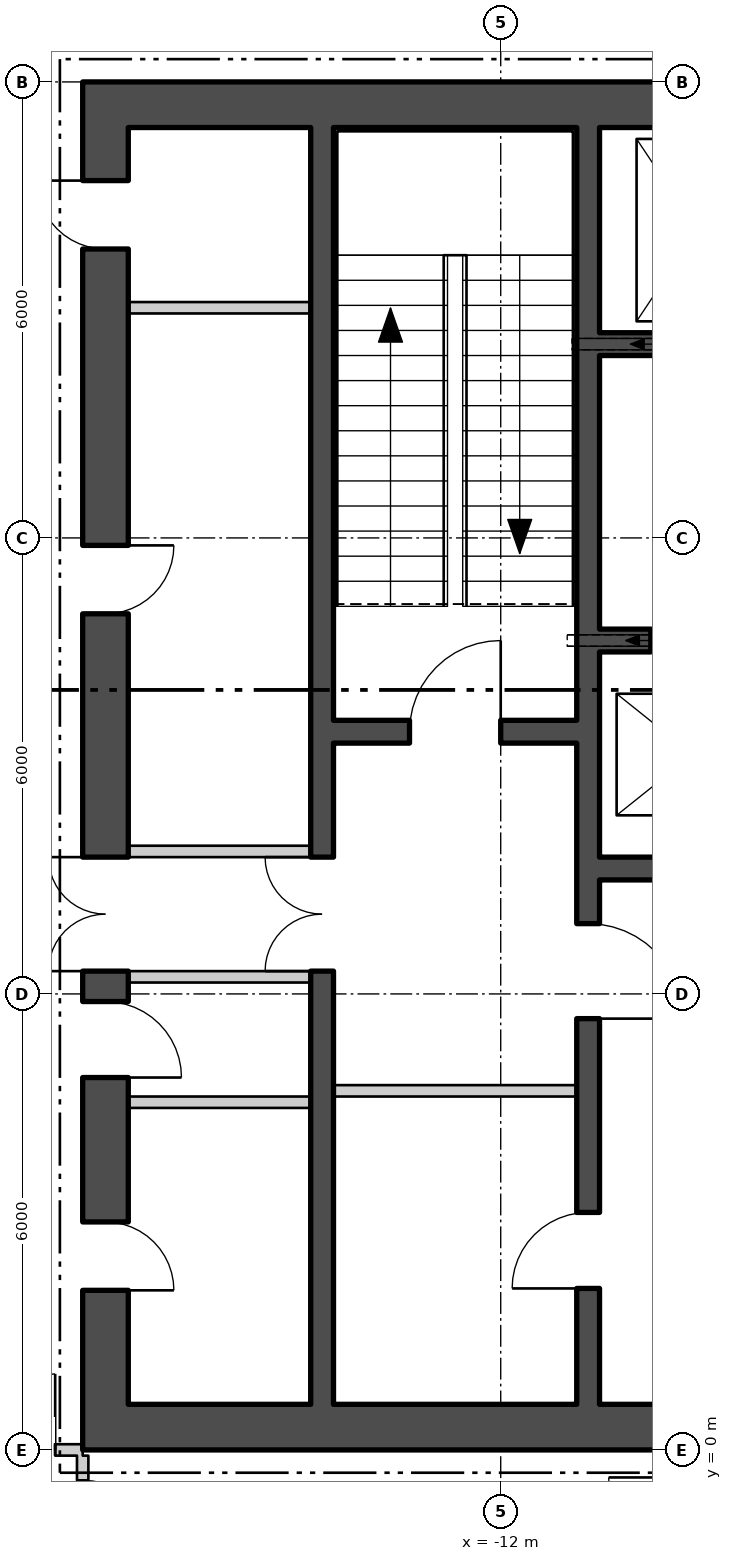
"""IFC4 building model, lengths in metres.
Left out: names, types, materials, properties, quantities, classifications, styles, units other than length and angle.
Written with IfcOpenShell. Run it as: python <this file> out.ifc"""

import sys

from ifc_helpers import new_model, si_unit, direction, frame, frame_2d, origin, place, context, subcontext, project, spatial, polyline, rectangle, outline, extrude, element, fill, save


model = new_model("IFC4")
c1 = context("Model", 3, precision=1e-05, world=origin(), true_north=direction((0.0, 1.0)))
c2 = subcontext(c1, "Body", "Model", "MODEL_VIEW")
j1 = project(units=[si_unit("LENGTHUNIT", "METRE"), si_unit("PLANEANGLEUNIT", "RADIAN")], contexts=[c1])
p1 = place(None, origin())
s1 = spatial("IfcSite", under=j1, at=p1, CompositionType="ELEMENT")
p2 = place(p1, origin())
s2 = spatial("IfcBuilding", under=s1, at=p2, CompositionType="ELEMENT")
p3 = place(p2, frame((0.0, 0.0, 60.3)))
s3 = spatial("IfcBuildingStorey", under=s2, at=p3, CompositionType="ELEMENT", Elevation=60.3)
p4 = place(p3, frame((-28.3, 10.579, -0.18), z_axis=(0.0, 0.0, 1.0), x_axis=(0.499999388847, -0.866025756634, 0.0)))
e1 = element("IfcWall", 1, at=p4, inside=s3, PredefinedType="SOLIDWALL", context=c2, shape_type="SweptSolid", body=[
    extrude(outline(polyline([(-0.13, -0.225), (45.88, -0.225), (45.62, 0.225), (0.13, 0.225), (-0.13, -0.225)])), origin(), (0.0, 0.0, 1.0), 4.28),
])
p5 = place(p4, frame((1.425, 0.0, 1.08)))
e2 = element("IfcOpeningElement", 2, at=p5, cuts=e1, PredefinedType="OPENING", context=c2, shape_type="SweptSolid", body=[
    extrude(rectangle(XDim=2.4, YDim=2.6, at=frame_2d((1.2, 1.3))), frame((0.0, 0.235, 0.0), z_axis=(0.0, -1.0, 0.0), x_axis=(1.0, 0.0, 0.0)), (0.0, 0.0, 1.0), 0.47),
])
p6 = place(p4, frame((5.895, 0.0, 1.08)))
e3 = element("IfcOpeningElement", 3, at=p6, cuts=e1, PredefinedType="OPENING", context=c2, shape_type="SweptSolid", body=[
    extrude(rectangle(XDim=2.4, YDim=2.6, at=frame_2d((1.2, 1.3))), frame((0.0, 0.235, 0.0), z_axis=(0.0, -1.0, 0.0), x_axis=(1.0, 0.0, 0.0)), (0.0, 0.0, 1.0), 0.47),
])
p7 = place(p4, frame((10.403, 0.0, 1.08)))
e4 = element("IfcOpeningElement", 4, at=p7, cuts=e1, PredefinedType="OPENING", context=c2, shape_type="SweptSolid", body=[
    extrude(rectangle(XDim=2.4, YDim=2.6, at=frame_2d((1.2, 1.3))), frame((0.0, 0.235, 0.0), z_axis=(0.0, -1.0, 0.0), x_axis=(1.0, 0.0, 0.0)), (0.0, 0.0, 1.0), 0.47),
])
p8 = place(p4, frame((14.912, 0.0, 1.08)))
e5 = element("IfcOpeningElement", 5, at=p8, cuts=e1, PredefinedType="OPENING", context=c2, shape_type="SweptSolid", body=[
    extrude(rectangle(XDim=2.4, YDim=2.6, at=frame_2d((1.2, 1.3))), frame((0.0, 0.235, 0.0), z_axis=(0.0, -1.0, 0.0), x_axis=(1.0, 0.0, 0.0)), (0.0, 0.0, 1.0), 0.47),
])
p9 = place(p4, frame((19.421, 0.0, 1.08)))
e6 = element("IfcOpeningElement", 6, at=p9, cuts=e1, PredefinedType="OPENING", context=c2, shape_type="SweptSolid", body=[
    extrude(rectangle(XDim=2.4, YDim=2.6, at=frame_2d((1.2, 1.3))), frame((0.0, 0.235, 0.0), z_axis=(0.0, -1.0, 0.0), x_axis=(1.0, 0.0, 0.0)), (0.0, 0.0, 1.0), 0.47),
])
p10 = place(p4, frame((23.929, 0.0, 1.08)))
e7 = element("IfcOpeningElement", 7, at=p10, cuts=e1, PredefinedType="OPENING", context=c2, shape_type="SweptSolid", body=[
    extrude(rectangle(XDim=2.4, YDim=2.6, at=frame_2d((1.2, 1.3))), frame((0.0, 0.235, 0.0), z_axis=(0.0, -1.0, 0.0), x_axis=(1.0, 0.0, 0.0)), (0.0, 0.0, 1.0), 0.47),
])
p11 = place(p4, frame((28.438, 0.0, 1.08)))
e8 = element("IfcOpeningElement", 8, at=p11, cuts=e1, PredefinedType="OPENING", context=c2, shape_type="SweptSolid", body=[
    extrude(rectangle(XDim=2.4, YDim=2.6, at=frame_2d((1.2, 1.3))), frame((0.0, 0.235, 0.0), z_axis=(0.0, -1.0, 0.0), x_axis=(1.0, 0.0, 0.0)), (0.0, 0.0, 1.0), 0.47),
])
p12 = place(p4, frame((32.947, 0.0, 1.08)))
e9 = element("IfcOpeningElement", 9, at=p12, cuts=e1, PredefinedType="OPENING", context=c2, shape_type="SweptSolid", body=[
    extrude(rectangle(XDim=2.4, YDim=2.6, at=frame_2d((1.2, 1.3))), frame((0.0, 0.235, 0.0), z_axis=(0.0, -1.0, 0.0), x_axis=(1.0, 0.0, 0.0)), (0.0, 0.0, 1.0), 0.47),
])
p13 = place(p4, frame((37.455, 0.0, 1.08)))
e10 = element("IfcOpeningElement", 10, at=p13, cuts=e1, PredefinedType="OPENING", context=c2, shape_type="SweptSolid", body=[
    extrude(rectangle(XDim=2.4, YDim=2.6, at=frame_2d((1.2, 1.3))), frame((0.0, 0.235, 0.0), z_axis=(0.0, -1.0, 0.0), x_axis=(1.0, 0.0, 0.0)), (0.0, 0.0, 1.0), 0.47),
])
p14 = place(p4, frame((41.925, 0.0, 1.08)))
e11 = element("IfcOpeningElement", 11, at=p14, cuts=e1, PredefinedType="OPENING", context=c2, shape_type="SweptSolid", body=[
    extrude(rectangle(XDim=2.4, YDim=2.6, at=frame_2d((1.2, 1.3))), frame((0.0, 0.235, 0.0), z_axis=(0.0, -1.0, 0.0), x_axis=(1.0, 0.0, 0.0)), (0.0, 0.0, 1.0), 0.47),
])
p15 = place(p3, frame((-17.5, 0.3, 0.0), z_axis=(0.0, 0.0, 1.0), x_axis=(1.0, 0.0, 0.0)))
e12 = element("IfcWall", 12, at=p15, inside=s3, PredefinedType="SHEAR", context=c2, shape_type="SweptSolid", body=[
    extrude(rectangle(XDim=35.0, YDim=0.6, at=frame_2d((17.5, 0.0))), origin(), (0.0, 0.0, 1.0), 4.3),
])
p16 = place(p15, frame((12.0, 0.0, 0.0)))
e13 = element("IfcOpeningElement", 13, at=p16, cuts=e12, PredefinedType="OPENING", context=c2, shape_type="SweptSolid", body=[
    extrude(rectangle(XDim=1.8, YDim=2.4, at=frame_2d((0.9, 1.2))), frame((0.0, 0.31, 0.0), z_axis=(0.0, -1.0, 0.0), x_axis=(1.0, 0.0, 0.0)), (0.0, 0.0, 1.0), 0.62),
])
p17 = place(p15, frame((22.0, 0.0, 0.0)))
e14 = element("IfcOpeningElement", 14, at=p17, cuts=e12, PredefinedType="OPENING", context=c2, shape_type="SweptSolid", body=[
    extrude(rectangle(XDim=1.8, YDim=2.4, at=frame_2d((0.9, 1.2))), frame((0.0, 0.31, 0.0), z_axis=(0.0, -1.0, 0.0), x_axis=(1.0, 0.0, 0.0)), (0.0, 0.0, 1.0), 0.62),
])
p18 = place(p3, frame((-17.5, 17.7, 0.0), z_axis=(0.0, 0.0, 1.0), x_axis=(1.0, 0.0, 0.0)))
e15 = element("IfcWall", 15, at=p18, inside=s3, PredefinedType="SHEAR", context=c2, shape_type="SweptSolid", body=[
    extrude(rectangle(XDim=35.0, YDim=0.6, at=frame_2d((17.5, 0.0))), origin(), (0.0, 0.0, 1.0), 4.3),
])
p19 = place(p3, frame((-17.2, 0.6, 0.0), z_axis=(0.0, 0.0, 1.0), x_axis=(0.0, 1.0, 0.0)))
e16 = element("IfcWall", 16, at=p19, inside=s3, PredefinedType="SHEAR", context=c2, shape_type="SweptSolid", body=[
    extrude(rectangle(XDim=16.8, YDim=0.6, at=frame_2d((8.4, 0.0))), origin(), (0.0, 0.0, 1.0), 4.3),
])
p20 = place(p19, frame((5.7, 0.0, 0.0)))
e17 = element("IfcOpeningElement", 17, at=p20, cuts=e16, PredefinedType="OPENING", context=c2, shape_type="SweptSolid", body=[
    extrude(rectangle(XDim=1.5, YDim=2.1, at=frame_2d((0.75, 1.05))), frame((0.0, 0.31, 0.0), z_axis=(0.0, -1.0, 0.0), x_axis=(1.0, 0.0, 0.0)), (0.0, 0.0, 1.0), 0.62),
])
p21 = place(p19, frame((1.5, 0.0, 0.0)))
e18 = element("IfcOpeningElement", 18, at=p21, cuts=e16, PredefinedType="OPENING", context=c2, shape_type="SweptSolid", body=[
    extrude(rectangle(XDim=0.9, YDim=2.1, at=frame_2d((0.45, 1.05))), frame((0.0, 0.31, 0.0), z_axis=(0.0, -1.0, 0.0), x_axis=(1.0, 0.0, 0.0)), (0.0, 0.0, 1.0), 0.62),
])
p22 = place(p19, frame((4.3, 0.0, 0.0)))
e19 = element("IfcOpeningElement", 19, at=p22, cuts=e16, PredefinedType="OPENING", context=c2, shape_type="SweptSolid", body=[
    extrude(rectangle(XDim=1.0, YDim=2.1, at=frame_2d((0.5, 1.05))), frame((0.0, 0.31, 0.0), z_axis=(0.0, -1.0, 0.0), x_axis=(1.0, 0.0, 0.0)), (0.0, 0.0, 1.0), 0.62),
])
p23 = place(p19, frame((10.402, 0.0, 0.0)))
e20 = element("IfcOpeningElement", 20, at=p23, cuts=e16, PredefinedType="OPENING", context=c2, shape_type="SweptSolid", body=[
    extrude(rectangle(XDim=0.9, YDim=2.1, at=frame_2d((0.45, 1.05))), frame((0.0, 0.31, 0.0), z_axis=(0.0, -1.0, 0.0), x_axis=(1.0, 0.0, 0.0)), (0.0, 0.0, 1.0), 0.62),
])
p24 = place(p19, frame((15.202, 0.0, 0.0)))
e21 = element("IfcOpeningElement", 21, at=p24, cuts=e16, PredefinedType="OPENING", context=c2, shape_type="SweptSolid", body=[
    extrude(rectangle(XDim=0.9, YDim=2.1, at=frame_2d((0.45, 1.05))), frame((0.0, 0.31, 0.0), z_axis=(0.0, -1.0, 0.0), x_axis=(1.0, 0.0, 0.0)), (0.0, 0.0, 1.0), 0.62),
])
p25 = place(p3, frame((-10.85, 0.6, 0.0), z_axis=(0.0, 0.0, 1.0), x_axis=(0.0, 1.0, 0.0)))
e22 = element("IfcWall", 22, at=p25, inside=s3, PredefinedType="SHEAR", context=c2, shape_type="SweptSolid", body=[
    extrude(rectangle(XDim=16.8, YDim=0.3, at=frame_2d((8.4, 0.0))), origin(), (0.0, 0.0, 1.0), 4.3),
])
p26 = place(p25, frame((5.075, 0.0, 0.0)))
e23 = element("IfcOpeningElement", 23, at=p26, cuts=e22, PredefinedType="OPENING", context=c2, shape_type="SweptSolid", body=[
    extrude(rectangle(XDim=1.25, YDim=2.1, at=frame_2d((0.625, 1.05))), frame((0.0, 0.16, 0.0), z_axis=(0.0, -1.0, 0.0), x_axis=(1.0, 0.0, 0.0)), (0.0, 0.0, 1.0), 0.32),
])
p27 = place(p25, frame((1.525, 0.0, 0.0)))
e24 = element("IfcOpeningElement", 24, at=p27, cuts=e22, PredefinedType="OPENING", context=c2, shape_type="SweptSolid", body=[
    extrude(rectangle(XDim=1.0, YDim=2.1, at=frame_2d((0.5, 1.05))), frame((0.0, 0.16, 0.0), z_axis=(0.0, -1.0, 0.0), x_axis=(1.0, 0.0, 0.0)), (0.0, 0.0, 1.0), 0.32),
])
p28 = place(p3, frame((-14.35, 0.6, 0.0), z_axis=(0.0, 0.0, 1.0), x_axis=(0.0, 1.0, 0.0)))
e25 = element("IfcWall", 25, at=p28, inside=s3, PredefinedType="SHEAR", context=c2, shape_type="SweptSolid", body=[
    extrude(rectangle(XDim=16.8, YDim=0.3, at=frame_2d((8.4, 0.0))), origin(), (0.0, 0.0, 1.0), 4.3),
])
p29 = place(p28, frame((5.7, 0.0, 0.0)))
e26 = element("IfcOpeningElement", 26, at=p29, cuts=e25, PredefinedType="OPENING", context=c2, shape_type="SweptSolid", body=[
    extrude(rectangle(XDim=1.5, YDim=2.1, at=frame_2d((0.75, 1.05))), frame((0.0, 0.16, 0.0), z_axis=(0.0, -1.0, 0.0), x_axis=(1.0, 0.0, 0.0)), (0.0, 0.0, 1.0), 0.32),
])
p30 = place(p3, frame((-14.2, 9.45, 0.0), z_axis=(0.0, 0.0, 1.0), x_axis=(1.0, 0.0, 0.0)))
e27 = element("IfcWall", 27, at=p30, inside=s3, PredefinedType="SHEAR", context=c2, shape_type="SweptSolid", body=[
    extrude(rectangle(XDim=3.2, YDim=0.3, at=frame_2d((1.6, 0.0))), origin(), (0.0, 0.0, 1.0), 4.3),
])
p31 = place(p30, frame((1.0, 0.0, 0.0)))
e28 = element("IfcOpeningElement", 28, at=p31, cuts=e27, PredefinedType="OPENING", context=c2, shape_type="SweptSolid", body=[
    extrude(rectangle(XDim=1.2, YDim=2.1, at=frame_2d((0.6, 1.05))), frame((0.0, 0.16, 0.0), z_axis=(0.0, -1.0, 0.0), x_axis=(1.0, 0.0, 0.0)), (0.0, 0.0, 1.0), 0.32),
])
p32 = place(p3, frame((-10.7, 14.55, 0.0), z_axis=(0.0, 0.0, 1.0), x_axis=(1.0, 0.0, 0.0)))
e29 = element("IfcWall", 29, at=p32, inside=s3, PredefinedType="SHEAR", context=c2, shape_type="SweptSolid", body=[
    extrude(rectangle(XDim=21.4, YDim=0.3, at=frame_2d((10.7, 0.0))), origin(), (0.0, 0.0, 1.0), 4.3),
])
p33 = place(p32, frame((0.738, 0.0, 0.0)))
e30 = element("IfcOpeningElement", 30, at=p33, cuts=e29, PredefinedType="OPENING", context=c2, shape_type="SweptSolid", body=[
    extrude(rectangle(XDim=1.1, YDim=2.1, at=frame_2d((0.55, 1.05))), frame((0.0, 0.16, 0.0), z_axis=(0.0, -1.0, 0.0), x_axis=(1.0, 0.0, 0.0)), (0.0, 0.0, 1.0), 0.32),
])
p34 = place(p32, frame((3.462, 0.0, 0.0)))
e31 = element("IfcOpeningElement", 31, at=p34, cuts=e29, PredefinedType="OPENING", context=c2, shape_type="SweptSolid", body=[
    extrude(rectangle(XDim=1.1, YDim=2.1, at=frame_2d((0.55, 1.05))), frame((0.0, 0.16, 0.0), z_axis=(0.0, -1.0, 0.0), x_axis=(1.0, 0.0, 0.0)), (0.0, 0.0, 1.0), 0.32),
])
p35 = place(p32, frame((6.138, 0.0, 0.0)))
e32 = element("IfcOpeningElement", 32, at=p35, cuts=e29, PredefinedType="OPENING", context=c2, shape_type="SweptSolid", body=[
    extrude(rectangle(XDim=1.1, YDim=2.1, at=frame_2d((0.55, 1.05))), frame((0.0, 0.16, 0.0), z_axis=(0.0, -1.0, 0.0), x_axis=(1.0, 0.0, 0.0)), (0.0, 0.0, 1.0), 0.32),
])
p36 = place(p32, frame((8.812, 0.0, 0.0)))
e33 = element("IfcOpeningElement", 33, at=p36, cuts=e29, PredefinedType="OPENING", context=c2, shape_type="SweptSolid", body=[
    extrude(rectangle(XDim=1.1, YDim=2.1, at=frame_2d((0.55, 1.05))), frame((0.0, 0.16, 0.0), z_axis=(0.0, -1.0, 0.0), x_axis=(1.0, 0.0, 0.0)), (0.0, 0.0, 1.0), 0.32),
])
p37 = place(p32, frame((14.162, 0.0, 0.0)))
e34 = element("IfcOpeningElement", 34, at=p37, cuts=e29, PredefinedType="OPENING", context=c2, shape_type="SweptSolid", body=[
    extrude(rectangle(XDim=1.1, YDim=2.1, at=frame_2d((0.55, 1.05))), frame((0.0, 0.16, 0.0), z_axis=(0.0, -1.0, 0.0), x_axis=(1.0, 0.0, 0.0)), (0.0, 0.0, 1.0), 0.32),
])
p38 = place(p32, frame((16.837, 0.0, 0.0)))
e35 = element("IfcOpeningElement", 35, at=p38, cuts=e29, PredefinedType="OPENING", context=c2, shape_type="SweptSolid", body=[
    extrude(rectangle(XDim=1.1, YDim=2.1, at=frame_2d((0.55, 1.05))), frame((0.0, 0.16, 0.0), z_axis=(0.0, -1.0, 0.0), x_axis=(1.0, 0.0, 0.0)), (0.0, 0.0, 1.0), 0.32),
])
p39 = place(p32, frame((19.562, 0.0, 0.0)))
e36 = element("IfcOpeningElement", 36, at=p39, cuts=e29, PredefinedType="OPENING", context=c2, shape_type="SweptSolid", body=[
    extrude(rectangle(XDim=1.1, YDim=2.1, at=frame_2d((0.55, 1.05))), frame((0.0, 0.16, 0.0), z_axis=(0.0, -1.0, 0.0), x_axis=(1.0, 0.0, 0.0)), (0.0, 0.0, 1.0), 0.32),
])
p40 = place(p3, frame((-10.7, 10.65, 0.0), z_axis=(0.0, 0.0, 1.0), x_axis=(1.0, 0.0, 0.0)))
e37 = element("IfcWall", 37, at=p40, inside=s3, PredefinedType="SHEAR", context=c2, shape_type="SweptSolid", body=[
    extrude(rectangle(XDim=10.3, YDim=0.3, at=frame_2d((5.15, 0.0))), origin(), (0.0, 0.0, 1.0), 4.3),
])
p41 = place(p40, frame((0.675, 0.0, 0.0)))
e38 = element("IfcOpeningElement", 38, at=p41, cuts=e37, PredefinedType="OPENING", context=c2, shape_type="SweptSolid", body=[
    extrude(rectangle(XDim=1.1, YDim=2.1, at=frame_2d((0.55, 1.05))), frame((0.0, 0.16, 0.0), z_axis=(0.0, -1.0, 0.0), x_axis=(1.0, 0.0, 0.0)), (0.0, 0.0, 1.0), 0.32),
])
p42 = place(p40, frame((3.275, 0.0, 0.0)))
e39 = element("IfcOpeningElement", 39, at=p42, cuts=e37, PredefinedType="OPENING", context=c2, shape_type="SweptSolid", body=[
    extrude(rectangle(XDim=1.1, YDim=2.1, at=frame_2d((0.55, 1.05))), frame((0.0, 0.16, 0.0), z_axis=(0.0, -1.0, 0.0), x_axis=(1.0, 0.0, 0.0)), (0.0, 0.0, 1.0), 0.32),
])
p43 = place(p40, frame((5.825, 0.0, 0.0)))
e40 = element("IfcOpeningElement", 40, at=p43, cuts=e37, PredefinedType="OPENING", context=c2, shape_type="SweptSolid", body=[
    extrude(rectangle(XDim=1.1, YDim=2.1, at=frame_2d((0.55, 1.05))), frame((0.0, 0.16, 0.0), z_axis=(0.0, -1.0, 0.0), x_axis=(1.0, 0.0, 0.0)), (0.0, 0.0, 1.0), 0.32),
])
p44 = place(p40, frame((8.375, 0.0, 0.0)))
e41 = element("IfcOpeningElement", 41, at=p44, cuts=e37, PredefinedType="OPENING", context=c2, shape_type="SweptSolid", body=[
    extrude(rectangle(XDim=1.1, YDim=2.1, at=frame_2d((0.55, 1.05))), frame((0.0, 0.16, 0.0), z_axis=(0.0, -1.0, 0.0), x_axis=(1.0, 0.0, 0.0)), (0.0, 0.0, 1.0), 0.32),
])
p45 = place(p3, frame((-10.7, 7.65, 0.0), z_axis=(0.0, 0.0, 1.0), x_axis=(1.0, 0.0, 0.0)))
e42 = element("IfcWall", 42, at=p45, inside=s3, PredefinedType="SHEAR", context=c2, shape_type="SweptSolid", body=[
    extrude(rectangle(XDim=10.3, YDim=0.3, at=frame_2d((5.15, 0.0))), origin(), (0.0, 0.0, 1.0), 4.3),
])
p46 = place(p3, frame((-14.2, 4.725, 0.0), z_axis=(0.0, 0.0, 1.0), x_axis=(1.0, 0.0, 0.0)))
e43 = element("IfcWall", 43, at=p46, inside=s3, PredefinedType="PARTITIONING", context=c2, shape_type="SweptSolid", body=[
    extrude(rectangle(XDim=3.2, YDim=0.15, at=frame_2d((1.6, 0.0))), origin(), (0.0, 0.0, 1.0), 4.3),
])
for number, where, z_axis, x_axis in (
    (44, (-16.9, 6.225, 0.0), (0.0, 0.0, 1.0), (1.0, 0.0, 0.0)),
    (45, (-16.9, 7.875, 0.0), (0.0, 0.0, 1.0), (1.0, 0.0, 0.0)),
    (46, (-16.9, 4.575, 0.0), (0.0, 0.0, 1.0), (1.0, 0.0, 0.0)),
    (47, (-16.9, 15.028, 0.0), (0.0, 0.0, 1.0), (1.0, 0.0, 0.0)),
):
    element("IfcWall", number, at=place(p3, frame(where, z_axis=z_axis, x_axis=x_axis)), inside=s3, PredefinedType="PARTITIONING", context=c2, shape_type="SweptSolid", body=[
        extrude(rectangle(XDim=2.4, YDim=0.15, at=frame_2d((1.2, 0.0))), origin(), (0.0, 0.0, 1.0), 4.3),
    ])
p47 = place(p3, frame((-19.225, 0.0, 0.0), z_axis=(0.0, 0.0, 1.0), x_axis=(1.0, 0.0, 0.0)))
e48 = element("IfcWall", 48, at=p47, inside=s3, PredefinedType="PARTITIONING", context=c2, shape_type="SweptSolid", body=[
    extrude(rectangle(XDim=1.725, YDim=0.15, at=frame_2d((0.863, 0.0))), origin(), (0.0, 0.0, 1.0), 3.61),
])
p48 = place(p47, frame((0.363, 0.0, 0.0)))
e49 = element("IfcOpeningElement", 49, at=p48, cuts=e48, PredefinedType="OPENING", context=c2, shape_type="SweptSolid", body=[
    extrude(rectangle(XDim=1.0, YDim=2.1, at=frame_2d((0.5, 1.05))), frame((0.0, 0.085, 0.0), z_axis=(0.0, -1.0, 0.0), x_axis=(1.0, 0.0, 0.0)), (0.0, 0.0, 1.0), 0.17),
])
p49 = place(p3, frame((-17.5, -1.725, 0.0), z_axis=(0.0, 0.0, 1.0), x_axis=(0.0, 1.0, 0.0)))
e50 = element("IfcWall", 50, at=p49, inside=s3, PredefinedType="PARTITIONING", context=c2, shape_type="SweptSolid", body=[
    extrude(rectangle(XDim=1.65, YDim=0.15, at=frame_2d((0.825, 0.0))), origin(), (0.0, 0.0, 1.0), 4.3),
])
p50 = place(p49, frame((0.325, 0.0, 0.0)))
e51 = element("IfcOpeningElement", 51, at=p50, cuts=e50, PredefinedType="OPENING", context=c2, shape_type="SweptSolid", body=[
    extrude(rectangle(XDim=1.0, YDim=2.1, at=frame_2d((0.5, 1.05))), frame((0.0, 0.085, 0.0), z_axis=(0.0, -1.0, 0.0), x_axis=(1.0, 0.0, 0.0)), (0.0, 0.0, 1.0), 0.17),
])
p51 = place(p41, origin())
e52 = element("IfcDoor", 52, at=p51, inside=s3, OperationType="SLIDING_TO_LEFT", PredefinedType="DOOR", context=c2, shape_type="SweptSolid", body=[
    extrude(rectangle(XDim=1.1, YDim=2.1, at=frame_2d((0.55, 1.05))), frame((0.0, 0.025, 0.0), z_axis=(0.0, -1.0, 0.0), x_axis=(1.0, 0.0, 0.0)), (0.0, 0.0, 1.0), 0.05),
])
fill(e38, e52)
p52 = place(p31, origin())
e53 = element("IfcDoor", 53, at=p52, inside=s3, OperationType="SINGLE_SWING_LEFT", PredefinedType="DOOR", context=c2, shape_type="SweptSolid", body=[
    extrude(rectangle(XDim=1.2, YDim=2.1, at=frame_2d((0.6, 1.05))), frame((0.0, 0.025, 0.0), z_axis=(0.0, -1.0, 0.0), x_axis=(1.0, 0.0, 0.0)), (0.0, 0.0, 1.0), 0.05),
])
fill(e28, e53)
p53 = place(p26, origin())
e54 = element("IfcDoor", 54, at=p53, inside=s3, OperationType="SINGLE_SWING_LEFT", PredefinedType="DOOR", context=c2, shape_type="SweptSolid", body=[
    extrude(rectangle(XDim=1.25, YDim=2.1, at=frame_2d((0.625, 1.05))), frame((0.0, 0.025, 0.0), z_axis=(0.0, -1.0, 0.0), x_axis=(1.0, 0.0, 0.0)), (0.0, 0.0, 1.0), 0.05),
])
fill(e23, e54)
p54 = place(p27, origin())
e55 = element("IfcDoor", 55, at=p54, inside=s3, OperationType="SINGLE_SWING_RIGHT", PredefinedType="DOOR", context=c2, shape_type="SweptSolid", body=[
    extrude(rectangle(XDim=1.0, YDim=2.1, at=frame_2d((0.5, 1.05))), frame((0.0, 0.025, 0.0), z_axis=(0.0, -1.0, 0.0), x_axis=(1.0, 0.0, 0.0)), (0.0, 0.0, 1.0), 0.05),
])
fill(e24, e55)
p55 = place(p29, origin())
e56 = element("IfcDoor", 56, at=p55, inside=s3, OperationType="DOUBLE_DOOR_SINGLE_SWING", PredefinedType="DOOR", context=c2, shape_type="SweptSolid", body=[
    extrude(rectangle(XDim=1.5, YDim=2.1, at=frame_2d((0.75, 1.05))), frame((0.0, 0.025, 0.0), z_axis=(0.0, -1.0, 0.0), x_axis=(1.0, 0.0, 0.0)), (0.0, 0.0, 1.0), 0.05),
])
fill(e26, e56)
p56 = place(p20, origin())
e57 = element("IfcDoor", 57, at=p56, inside=s3, OperationType="DOUBLE_DOOR_SINGLE_SWING", PredefinedType="DOOR", context=c2, shape_type="SweptSolid", body=[
    extrude(rectangle(XDim=1.5, YDim=2.1, at=frame_2d((0.75, 1.05))), frame((0.0, 0.025, 0.0), z_axis=(0.0, -1.0, 0.0), x_axis=(1.0, 0.0, 0.0)), (0.0, 0.0, 1.0), 0.05),
])
fill(e17, e57)
p57 = place(p21, origin())
e58 = element("IfcDoor", 58, at=p57, inside=s3, OperationType="SINGLE_SWING_LEFT", PredefinedType="DOOR", context=c2, shape_type="SweptSolid", body=[
    extrude(rectangle(XDim=0.9, YDim=2.1, at=frame_2d((0.45, 1.05))), frame((0.0, 0.025, 0.0), z_axis=(0.0, -1.0, 0.0), x_axis=(1.0, 0.0, 0.0)), (0.0, 0.0, 1.0), 0.05),
])
fill(e18, e58)
p58 = place(p22, origin())
e59 = element("IfcDoor", 59, at=p58, inside=s3, OperationType="SINGLE_SWING_LEFT", PredefinedType="DOOR", context=c2, shape_type="SweptSolid", body=[
    extrude(rectangle(XDim=1.0, YDim=2.1, at=frame_2d((0.5, 1.05))), frame((0.0, 0.025, 0.0), z_axis=(0.0, -1.0, 0.0), x_axis=(1.0, 0.0, 0.0)), (0.0, 0.0, 1.0), 0.05),
])
fill(e19, e59)
p59 = place(p23, origin())
e60 = element("IfcDoor", 60, at=p59, inside=s3, OperationType="SINGLE_SWING_RIGHT", PredefinedType="DOOR", context=c2, shape_type="SweptSolid", body=[
    extrude(rectangle(XDim=0.9, YDim=2.1, at=frame_2d((0.45, 1.05))), frame((0.0, 0.025, 0.0), z_axis=(0.0, -1.0, 0.0), x_axis=(1.0, 0.0, 0.0)), (0.0, 0.0, 1.0), 0.05),
])
fill(e20, e60)
p60 = place(p24, origin())
e61 = element("IfcDoor", 61, at=p60, inside=s3, OperationType="SINGLE_SWING_LEFT", PredefinedType="DOOR", context=c2, shape_type="SweptSolid", body=[
    extrude(rectangle(XDim=0.9, YDim=2.1, at=frame_2d((0.45, 1.05))), frame((0.0, 0.025, 0.0), z_axis=(0.0, -1.0, 0.0), x_axis=(1.0, 0.0, 0.0)), (0.0, 0.0, 1.0), 0.05),
])
fill(e21, e61)
p61 = place(p48, origin())
e62 = element("IfcDoor", 62, at=p61, inside=s3, OperationType="SINGLE_SWING_LEFT", PredefinedType="DOOR", context=c2, shape_type="SweptSolid", body=[
    extrude(rectangle(XDim=1.0, YDim=2.1, at=frame_2d((0.5, 1.05))), frame((0.0, 0.025, 0.0), z_axis=(0.0, -1.0, 0.0), x_axis=(1.0, 0.0, 0.0)), (0.0, 0.0, 1.0), 0.05),
])
fill(e49, e62)
save(model, sys.argv[1])
